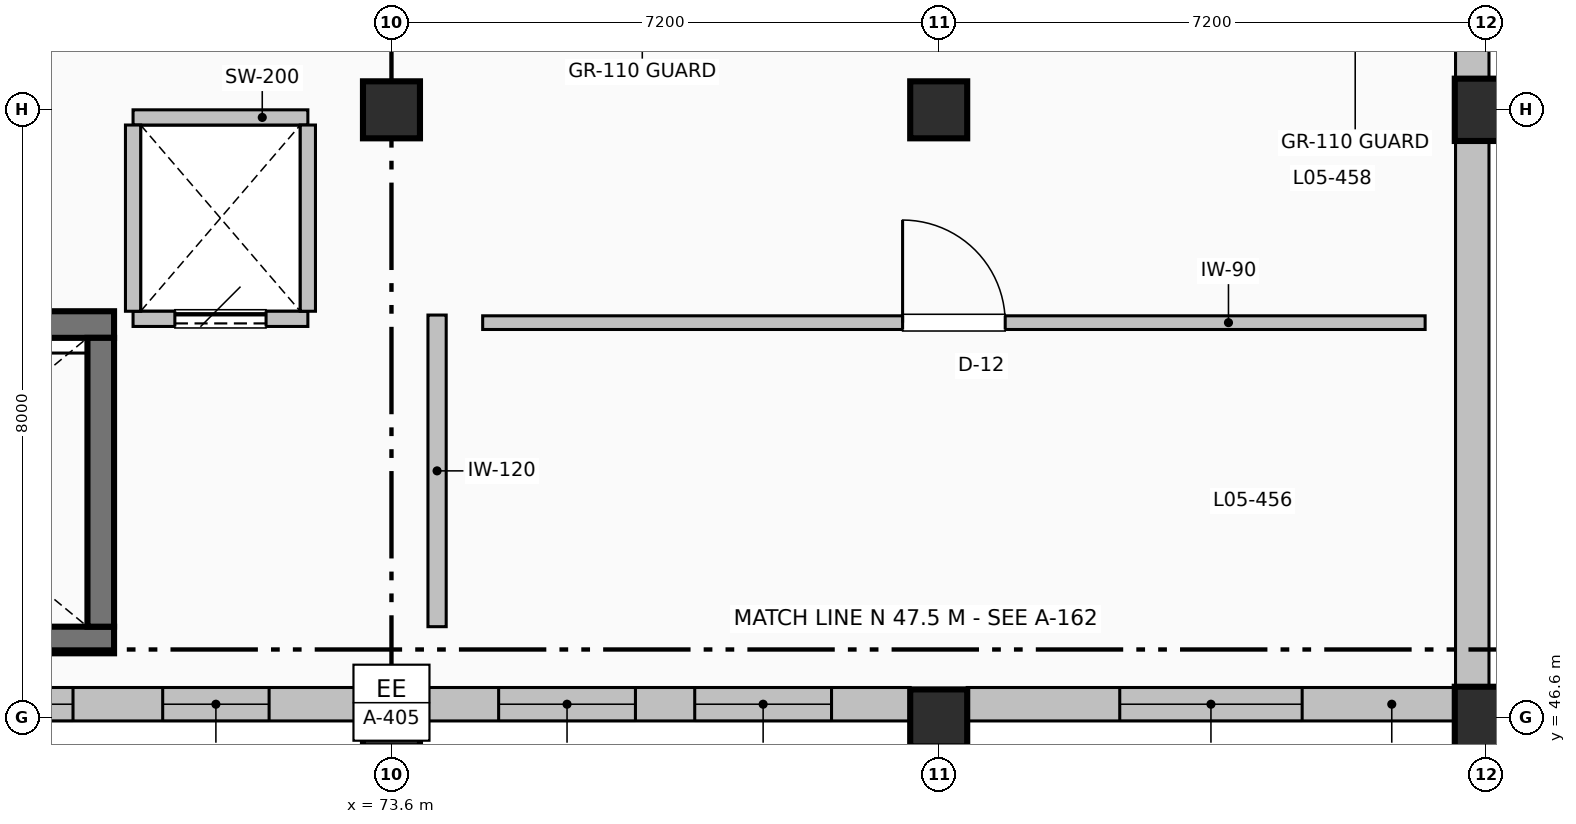
"""IFC4 building model, lengths in metres.
Left out: names, types, materials, properties, quantities, classifications, styles, units other than length and angle.
Written with IfcOpenShell. Run it as: python <this file> out.ifc"""

import sys

from ifc_helpers import new_model, si_unit, direction, frame, frame_2d, origin, origin_2d, place, context, subcontext, project, spatial, rectangle, extrude, element, fill, save


model = new_model("IFC4")
c1 = context("Model", 3, precision=1e-05, world=origin(), true_north=direction((0.0, 1.0)))
c2 = subcontext(c1, "Body", "Model", "MODEL_VIEW")
j1 = project(units=[si_unit("LENGTHUNIT", "METRE"), si_unit("PLANEANGLEUNIT", "RADIAN")], contexts=[c1])
p1 = place(None, origin())
s1 = spatial("IfcSite", under=j1, at=p1, CompositionType="ELEMENT")
p2 = place(p1, origin())
s2 = spatial("IfcBuilding", under=s1, at=p2, CompositionType="ELEMENT")
p3 = place(p2, frame((0.0, 0.0, 24.0)))
s3 = spatial("IfcBuildingStorey", under=s2, at=p3, CompositionType="ELEMENT", Elevation=24.0)
for number, where, z_axis, x_axis in (
    (1, (73.6, 46.6, 0.0), (0.0, 0.0, 1.0), (1.0, 0.0, 0.0)),
    (2, (73.6, 54.6, 0.0), (0.0, 0.0, 1.0), (1.0, 0.0, 0.0)),
    (3, (80.8, 46.6, 0.0), (0.0, 0.0, 1.0), (1.0, 0.0, 0.0)),
    (4, (80.8, 54.6, 0.0), (0.0, 0.0, 1.0), (1.0, 0.0, 0.0)),
):
    element("IfcColumn", number, at=place(p3, frame(where, z_axis=z_axis, x_axis=x_axis)), inside=s3, PredefinedType="COLUMN", context=c2, shape_type="SweptSolid", body=[
        extrude(rectangle(XDim=0.75, YDim=0.75, at=origin_2d()), origin(), (0.0, 0.0, 1.0), 4.5),
    ])
for number, where, z_axis, x_axis in (
    (5, (88.0, 46.6, 0.0), (0.0, 0.0, 1.0), (1.0, 0.0, 0.0)),
    (6, (88.0, 54.6, 0.0), (0.0, 0.0, 1.0), (1.0, 0.0, 0.0)),
):
    element("IfcColumn", number, at=place(p3, frame(where, z_axis=z_axis, x_axis=x_axis)), inside=s3, PredefinedType="COLUMN", context=c2, shape_type="SweptSolid", body=[
        extrude(rectangle(XDim=0.82, YDim=0.82, at=origin_2d()), origin(), (0.0, 0.0, 1.0), 4.5),
    ])
for number, where, z_axis, x_axis in (
    (7, (61.45, 47.625, 0.0), (0.0, 0.0, 1.0), (1.0, 0.0, 0.0)),
    (8, (69.95, 51.775, 0.0), (0.0, 0.0, 1.0), (-1.0, 0.0, 0.0)),
):
    element("IfcWall", number, at=place(p3, frame(where, z_axis=z_axis, x_axis=x_axis)), inside=s3, PredefinedType="SHEAR", context=c2, shape_type="SweptSolid", body=[
        extrude(rectangle(XDim=8.5, YDim=0.35, at=frame_2d((4.25, 0.0))), origin(), (0.0, 0.0, 1.0), 4.22),
    ])
p4 = place(p3, frame((69.775, 51.6, 0.0), z_axis=(0.0, 0.0, 1.0), x_axis=(0.0, -1.0, 0.0)))
e9 = element("IfcWall", 9, at=p4, inside=s3, PredefinedType="SHEAR", context=c2, shape_type="SweptSolid", body=[
    extrude(rectangle(XDim=3.8, YDim=0.35, at=frame_2d((1.9, 0.0))), origin(), (0.0, 0.0, 1.0), 4.22),
])
p5 = place(p3, frame((87.82, 62.09, 0.0), z_axis=(0.0, 0.0, 1.0), x_axis=(0.0, -1.0, 0.0)))
e10 = element("IfcWall", 10, at=p5, inside=s3, PredefinedType="SOLIDWALL", context=c2, shape_type="SweptSolid", body=[
    extrude(rectangle(XDim=7.08, YDim=0.44, at=frame_2d((3.54, 0.0))), origin(), (0.0, 0.0, 1.0), 3.462),
])
p6 = place(p5, frame((1.29, 0.0, 0.0)))
e11 = element("IfcOpeningElement", 11, at=p6, cuts=e10, PredefinedType="OPENING", context=c2, shape_type="SweptSolid", body=[
    extrude(rectangle(XDim=2.0, YDim=2.1, at=frame_2d((1.0, 1.05))), frame((0.0, 0.23, 0.0), z_axis=(0.0, -1.0, 0.0), x_axis=(1.0, 0.0, 0.0)), (0.0, 0.0, 1.0), 0.46),
])
p7 = place(p3, frame((87.82, 54.19, 0.0), z_axis=(0.0, 0.0, 1.0), x_axis=(0.0, -1.0, 0.0)))
e12 = element("IfcWall", 12, at=p7, inside=s3, PredefinedType="SOLIDWALL", context=c2, shape_type="SweptSolid", body=[
    extrude(rectangle(XDim=7.18, YDim=0.44, at=frame_2d((3.59, 0.0))), origin(), (0.0, 0.0, 1.0), 3.462),
])
p8 = place(p3, frame((87.59, 46.78, 0.0), z_axis=(0.0, 0.0, 1.0), x_axis=(-1.0, 0.0, 0.0)))
e13 = element("IfcWall", 13, at=p8, inside=s3, PredefinedType="SOLIDWALL", context=c2, shape_type="SweptSolid", body=[
    extrude(rectangle(XDim=6.415, YDim=0.44, at=frame_2d((3.208, 0.0))), origin(), (0.0, 0.0, 1.0), 3.462),
])
p9 = place(p8, frame((2.008, 0.0, 1.05)))
e14 = element("IfcOpeningElement", 14, at=p9, cuts=e13, PredefinedType="OPENING", context=c2, shape_type="SweptSolid", body=[
    extrude(rectangle(XDim=2.4, YDim=1.25, at=frame_2d((1.2, 0.625))), frame((0.0, 0.23, 0.0), z_axis=(0.0, -1.0, 0.0), x_axis=(1.0, 0.0, 0.0)), (0.0, 0.0, 1.0), 0.46),
])
p10 = place(p3, frame((80.425, 46.78, 0.0), z_axis=(0.0, 0.0, 1.0), x_axis=(-1.0, 0.0, 0.0)))
e15 = element("IfcWall", 15, at=p10, inside=s3, PredefinedType="SOLIDWALL", context=c2, shape_type="SweptSolid", body=[
    extrude(rectangle(XDim=6.45, YDim=0.44, at=frame_2d((3.225, 0.0))), origin(), (0.0, 0.0, 1.0), 3.462),
])
p11 = place(p10, frame((1.035, 0.0, 1.05)))
e16 = element("IfcOpeningElement", 16, at=p11, cuts=e15, PredefinedType="OPENING", context=c2, shape_type="SweptSolid", body=[
    extrude(rectangle(XDim=1.8, YDim=1.25, at=frame_2d((0.9, 0.625))), frame((0.0, 0.23, 0.0), z_axis=(0.0, -1.0, 0.0), x_axis=(1.0, 0.0, 0.0)), (0.0, 0.0, 1.0), 0.46),
])
p12 = place(p10, frame((3.615, 0.0, 1.05)))
e17 = element("IfcOpeningElement", 17, at=p12, cuts=e15, PredefinedType="OPENING", context=c2, shape_type="SweptSolid", body=[
    extrude(rectangle(XDim=1.8, YDim=1.25, at=frame_2d((0.9, 0.625))), frame((0.0, 0.23, 0.0), z_axis=(0.0, -1.0, 0.0), x_axis=(1.0, 0.0, 0.0)), (0.0, 0.0, 1.0), 0.46),
])
p13 = place(p3, frame((73.225, 46.78, 0.0), z_axis=(0.0, 0.0, 1.0), x_axis=(-1.0, 0.0, 0.0)))
e18 = element("IfcWall", 18, at=p13, inside=s3, PredefinedType="SOLIDWALL", context=c2, shape_type="SweptSolid", body=[
    extrude(rectangle(XDim=6.45, YDim=0.44, at=frame_2d((3.225, 0.0))), origin(), (0.0, 0.0, 1.0), 3.462),
])
p14 = place(p13, frame((1.235, 0.0, 1.0)))
e19 = element("IfcOpeningElement", 19, at=p14, cuts=e18, PredefinedType="OPENING", context=c2, shape_type="SweptSolid", body=[
    extrude(rectangle(XDim=1.4, YDim=1.2, at=frame_2d((0.7, 0.6))), frame((0.0, 0.23, 0.0), z_axis=(0.0, -1.0, 0.0), x_axis=(1.0, 0.0, 0.0)), (0.0, 0.0, 1.0), 0.46),
])
p15 = place(p13, frame((3.815, 0.0, 1.0)))
e20 = element("IfcOpeningElement", 20, at=p15, cuts=e18, PredefinedType="OPENING", context=c2, shape_type="SweptSolid", body=[
    extrude(rectangle(XDim=1.4, YDim=1.2, at=frame_2d((0.7, 0.6))), frame((0.0, 0.23, 0.0), z_axis=(0.0, -1.0, 0.0), x_axis=(1.0, 0.0, 0.0)), (0.0, 0.0, 1.0), 0.46),
])
p16 = place(p3, frame((70.2, 51.85, 0.0), z_axis=(0.0, 0.0, 1.0), x_axis=(1.0, 0.0, 0.0)))
e21 = element("IfcWall", 21, at=p16, inside=s3, PredefinedType="PARTITIONING", context=c2, shape_type="SweptSolid", body=[
    extrude(rectangle(XDim=2.3, YDim=0.2, at=frame_2d((1.15, 0.0))), origin(), (0.0, 0.0, 1.0), 4.192),
])
p17 = place(p16, frame((0.55, 0.0, 0.0)))
e22 = element("IfcOpeningElement", 22, at=p17, cuts=e21, PredefinedType="OPENING", context=c2, shape_type="SweptSolid", body=[
    extrude(rectangle(XDim=1.2, YDim=2.15, at=frame_2d((0.6, 1.075))), frame((0.0, 0.11, 0.0), z_axis=(0.0, -1.0, 0.0), x_axis=(1.0, 0.0, 0.0)), (0.0, 0.0, 1.0), 0.22),
])
p18 = place(p3, frame((72.5, 54.5, 0.0), z_axis=(0.0, 0.0, 1.0), x_axis=(-1.0, 0.0, 0.0)))
e23 = element("IfcWall", 23, at=p18, inside=s3, PredefinedType="PARTITIONING", context=c2, shape_type="SweptSolid", body=[
    extrude(rectangle(XDim=2.3, YDim=0.2, at=frame_2d((1.15, 0.0))), origin(), (0.0, 0.0, 1.0), 3.462),
])
for number, where, z_axis, x_axis in (
    (24, (70.2, 51.95, 0.0), (0.0, 0.0, 1.0), (0.0, 1.0, 0.0)),
    (25, (72.5, 54.4, 0.0), (0.0, 0.0, 1.0), (0.0, -1.0, 0.0)),
):
    element("IfcWall", number, at=place(p3, frame(where, z_axis=z_axis, x_axis=x_axis)), inside=s3, PredefinedType="PARTITIONING", context=c2, shape_type="SweptSolid", body=[
        extrude(rectangle(XDim=2.45, YDim=0.2, at=frame_2d((1.225, 0.0))), origin(), (0.0, 0.0, 1.0), 4.192),
    ])
p19 = place(p3, frame((74.2, 51.9, 0.0), z_axis=(0.0, 0.0, 1.0), x_axis=(0.0, -1.0, 0.0)))
e26 = element("IfcWall", 26, at=p19, inside=s3, PredefinedType="PARTITIONING", context=c2, shape_type="SweptSolid", body=[
    extrude(rectangle(XDim=4.1, YDim=0.24, at=frame_2d((2.05, 0.0))), origin(), (0.0, 0.0, 1.0), 4.192),
])
p20 = place(p3, frame((74.8, 51.8, 0.0), z_axis=(0.0, 0.0, 1.0), x_axis=(1.0, 0.0, 0.0)))
e27 = element("IfcWall", 27, at=p20, inside=s3, PredefinedType="PARTITIONING", context=c2, shape_type="SweptSolid", body=[
    extrude(rectangle(XDim=12.4, YDim=0.18, at=frame_2d((6.2, 0.0))), origin(), (0.0, 0.0, 1.0), 4.192),
])
p21 = place(p20, frame((5.525, 0.0, 0.0)))
e28 = element("IfcOpeningElement", 28, at=p21, cuts=e27, PredefinedType="OPENING", context=c2, shape_type="SweptSolid", body=[
    extrude(rectangle(XDim=1.35, YDim=2.16, at=frame_2d((0.675, 1.08))), frame((0.0, 0.1, 0.0), z_axis=(0.0, -1.0, 0.0), x_axis=(1.0, 0.0, 0.0)), (0.0, 0.0, 1.0), 0.2),
])
p22 = place(p9, origin())
e29 = element("IfcWindow", 29, at=p22, inside=s3, PartitioningType="SINGLE_PANEL", PredefinedType="WINDOW", context=c2, shape_type="SweptSolid", body=[
    extrude(rectangle(XDim=2.4, YDim=1.25, at=frame_2d((1.2, 0.625))), frame((0.0, 0.03, 0.0), z_axis=(0.0, -1.0, 0.0), x_axis=(1.0, 0.0, 0.0)), (0.0, 0.0, 1.0), 0.06),
])
fill(e14, e29)
p23 = place(p11, origin())
e30 = element("IfcWindow", 30, at=p23, inside=s3, PartitioningType="SINGLE_PANEL", PredefinedType="WINDOW", context=c2, shape_type="SweptSolid", body=[
    extrude(rectangle(XDim=1.8, YDim=1.25, at=frame_2d((0.9, 0.625))), frame((0.0, 0.03, 0.0), z_axis=(0.0, -1.0, 0.0), x_axis=(1.0, 0.0, 0.0)), (0.0, 0.0, 1.0), 0.06),
])
fill(e16, e30)
p24 = place(p12, origin())
e31 = element("IfcWindow", 31, at=p24, inside=s3, PartitioningType="SINGLE_PANEL", PredefinedType="WINDOW", context=c2, shape_type="SweptSolid", body=[
    extrude(rectangle(XDim=1.8, YDim=1.25, at=frame_2d((0.9, 0.625))), frame((0.0, 0.03, 0.0), z_axis=(0.0, -1.0, 0.0), x_axis=(1.0, 0.0, 0.0)), (0.0, 0.0, 1.0), 0.06),
])
fill(e17, e31)
p25 = place(p14, origin())
e32 = element("IfcWindow", 32, at=p25, inside=s3, PartitioningType="SINGLE_PANEL", PredefinedType="WINDOW", context=c2, shape_type="SweptSolid", body=[
    extrude(rectangle(XDim=1.4, YDim=1.2, at=frame_2d((0.7, 0.6))), frame((0.0, 0.03, 0.0), z_axis=(0.0, -1.0, 0.0), x_axis=(1.0, 0.0, 0.0)), (0.0, 0.0, 1.0), 0.06),
])
fill(e19, e32)
p26 = place(p15, origin())
e33 = element("IfcWindow", 33, at=p26, inside=s3, PartitioningType="SINGLE_PANEL", PredefinedType="WINDOW", context=c2, shape_type="SweptSolid", body=[
    extrude(rectangle(XDim=1.4, YDim=1.2, at=frame_2d((0.7, 0.6))), frame((0.0, 0.03, 0.0), z_axis=(0.0, -1.0, 0.0), x_axis=(1.0, 0.0, 0.0)), (0.0, 0.0, 1.0), 0.06),
])
fill(e20, e33)
p27 = place(p17, origin())
e34 = element("IfcDoor", 34, at=p27, inside=s3, OperationType="SLIDING_TO_LEFT", PredefinedType="DOOR", context=c2, shape_type="SweptSolid", body=[
    extrude(rectangle(XDim=1.2, YDim=2.15, at=frame_2d((0.6, 1.075))), frame((0.0, 0.025, 0.0), z_axis=(0.0, -1.0, 0.0), x_axis=(1.0, 0.0, 0.0)), (0.0, 0.0, 1.0), 0.05),
])
fill(e22, e34)
p28 = place(p21, origin())
e35 = element("IfcDoor", 35, at=p28, inside=s3, OperationType="SINGLE_SWING_LEFT", PredefinedType="DOOR", context=c2, shape_type="SweptSolid", body=[
    extrude(rectangle(XDim=1.35, YDim=2.16, at=frame_2d((0.675, 1.08))), frame((0.0, 0.025, 0.0), z_axis=(0.0, -1.0, 0.0), x_axis=(1.0, 0.0, 0.0)), (0.0, 0.0, 1.0), 0.05),
])
fill(e28, e35)
save(model, sys.argv[1])
